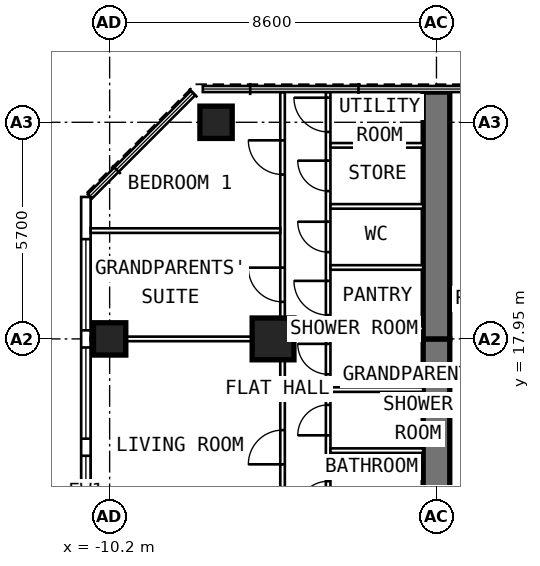
"""IFC4 building model, lengths in metres.
Left out: names, types, materials, properties, quantities, classifications, styles, units other than length and angle.
Written with IfcOpenShell. Run it as: python <this file> out.ifc"""

import sys

from ifc_helpers import new_model, si_unit, direction, frame, frame_2d, origin, origin_2d, place, context, subcontext, project, spatial, rectangle, extrude, element, fill, save


model = new_model("IFC4")
c1 = context("Model", 3, precision=1e-05, world=origin(), true_north=direction((0.0, 1.0)))
c2 = subcontext(c1, "Body", "Model", "MODEL_VIEW")
j1 = project(units=[si_unit("LENGTHUNIT", "METRE"), si_unit("PLANEANGLEUNIT", "RADIAN")], contexts=[c1])
p1 = place(None, origin())
s1 = spatial("IfcSite", under=j1, at=p1, CompositionType="ELEMENT")
p2 = place(p1, origin())
s2 = spatial("IfcBuilding", under=s1, at=p2, CompositionType="ELEMENT")
p3 = place(p2, frame((0.0, 0.0, 253.2)))
s3 = spatial("IfcBuildingStorey", under=s2, at=p3, CompositionType="ELEMENT", Elevation=253.2)
for number, where, z_axis, x_axis in (
    (1, (-10.2, 17.95, 0.0), (0.0, 0.0, 1.0), (0.0, 1.0, 0.0)),
    (2, (-7.4, 23.65, 0.0), (0.0, 0.0, 1.0), (0.0, 1.0, 0.0)),
):
    element("IfcColumn", number, at=place(p3, frame(where, z_axis=z_axis, x_axis=x_axis)), inside=s3, PredefinedType="COLUMN", context=c2, shape_type="SweptSolid", body=[
        extrude(rectangle(XDim=0.85, YDim=0.85, at=origin_2d()), origin(), (0.0, 0.0, 1.0), 3.6),
    ])
p4 = place(p3, frame((-5.9, 17.95, 0.0), z_axis=(0.0, 0.0, 1.0), x_axis=(0.0, 1.0, 0.0)))
e3 = element("IfcColumn", 3, at=p4, inside=s3, PredefinedType="COLUMN", context=c2, shape_type="SweptSolid", body=[
    extrude(rectangle(XDim=1.1, YDim=1.1, at=origin_2d()), origin(), (0.0, 0.0, 1.0), 3.6),
])
p5 = place(p3, frame((-1.6, 9.6, 0.0), z_axis=(0.0, 0.0, 1.0), x_axis=(0.0, 1.0, 0.0)))
e4 = element("IfcWall", 4, at=p5, inside=s3, PredefinedType="SHEAR", context=c2, shape_type="SweptSolid", body=[
    extrude(rectangle(XDim=8.35, YDim=0.7, at=frame_2d((4.175, 0.0))), origin(), (0.0, 0.0, 1.0), 3.6),
])
p6 = place(p5, frame((1.3, 0.0, 0.0)))
e5 = element("IfcOpeningElement", 5, at=p6, cuts=e4, PredefinedType="OPENING", context=c2, shape_type="SweptSolid", body=[
    extrude(rectangle(XDim=1.0, YDim=2.1, at=frame_2d((0.5, 1.05))), frame((0.0, 0.362, 0.0), z_axis=(0.0, -1.0, 0.0), x_axis=(1.0, 0.0, 0.0)), (0.0, 0.0, 1.0), 0.724),
])
p7 = place(p3, frame((-1.6, 17.95, 0.0), z_axis=(0.0, 0.0, 1.0), x_axis=(0.0, 1.0, 0.0)))
e6 = element("IfcWall", 6, at=p7, inside=s3, PredefinedType="SHEAR", context=c2, shape_type="SweptSolid", body=[
    extrude(rectangle(XDim=6.495, YDim=0.7, at=frame_2d((3.248, 0.0))), origin(), (0.0, 0.0, 1.0), 3.6),
])
p8 = place(p3, frame((-10.825, 6.148, 0.0), z_axis=(0.0, 0.0, 1.0), x_axis=(0.0, 1.0, 0.0)))
e7 = element("IfcWall", 7, at=p8, inside=s3, PredefinedType="SOLIDWALL", context=c2, shape_type="SweptSolid", body=[
    extrude(rectangle(XDim=15.537, YDim=0.25, at=frame_2d((7.769, 0.0))), origin(), (0.0, 0.0, 1.0), 3.35),
])
p9 = place(p8, frame((0.627, 0.0, 0.8)))
e8 = element("IfcOpeningElement", 8, at=p9, cuts=e7, PredefinedType="OPENING", context=c2, shape_type="SweptSolid", body=[
    extrude(rectangle(XDim=2.4, YDim=1.8, at=frame_2d((1.2, 0.9))), frame((0.0, 0.137, 0.0), z_axis=(0.0, -1.0, 0.0), x_axis=(1.0, 0.0, 0.0)), (0.0, 0.0, 1.0), 0.274),
])
p10 = place(p8, frame((3.477, 0.0, 0.8)))
e9 = element("IfcOpeningElement", 9, at=p10, cuts=e7, PredefinedType="OPENING", context=c2, shape_type="SweptSolid", body=[
    extrude(rectangle(XDim=2.4, YDim=1.8, at=frame_2d((1.2, 0.9))), frame((0.0, 0.137, 0.0), z_axis=(0.0, -1.0, 0.0), x_axis=(1.0, 0.0, 0.0)), (0.0, 0.0, 1.0), 0.274),
])
p11 = place(p8, frame((6.327, 0.0, 0.8)))
e10 = element("IfcOpeningElement", 10, at=p11, cuts=e7, PredefinedType="OPENING", context=c2, shape_type="SweptSolid", body=[
    extrude(rectangle(XDim=2.4, YDim=1.8, at=frame_2d((1.2, 0.9))), frame((0.0, 0.137, 0.0), z_axis=(0.0, -1.0, 0.0), x_axis=(1.0, 0.0, 0.0)), (0.0, 0.0, 1.0), 0.274),
])
p12 = place(p8, frame((9.177, 0.0, 0.8)))
e11 = element("IfcOpeningElement", 11, at=p12, cuts=e7, PredefinedType="OPENING", context=c2, shape_type="SweptSolid", body=[
    extrude(rectangle(XDim=2.4, YDim=1.8, at=frame_2d((1.2, 0.9))), frame((0.0, 0.137, 0.0), z_axis=(0.0, -1.0, 0.0), x_axis=(1.0, 0.0, 0.0)), (0.0, 0.0, 1.0), 0.274),
])
p13 = place(p8, frame((12.027, 0.0, 0.8)))
e12 = element("IfcOpeningElement", 12, at=p13, cuts=e7, PredefinedType="OPENING", context=c2, shape_type="SweptSolid", body=[
    extrude(rectangle(XDim=2.4, YDim=1.8, at=frame_2d((1.2, 0.9))), frame((0.0, 0.137, 0.0), z_axis=(0.0, -1.0, 0.0), x_axis=(1.0, 0.0, 0.0)), (0.0, 0.0, 1.0), 0.274),
])
p14 = place(p3, frame((-4.45, 9.9, 0.0), z_axis=(0.0, 0.0, 1.0), x_axis=(0.0, 1.0, 0.0)))
e13 = element("IfcWall", 13, at=p14, inside=s3, PredefinedType="PARTITIONING", context=c2, shape_type="SweptSolid", body=[
    extrude(rectangle(XDim=14.545, YDim=0.12, at=frame_2d((7.272, 0.0))), origin(), (0.0, 0.0, 1.0), 3.35),
])
p15 = place(p14, frame((0.95, 0.0, 0.0)))
e14 = element("IfcOpeningElement", 14, at=p15, cuts=e13, PredefinedType="OPENING", context=c2, shape_type="SweptSolid", body=[
    extrude(rectangle(XDim=0.9, YDim=2.1, at=frame_2d((0.45, 1.05))), frame((0.0, 0.072, 0.0), z_axis=(0.0, -1.0, 0.0), x_axis=(1.0, 0.0, 0.0)), (0.0, 0.0, 1.0), 0.144),
])
p16 = place(p14, frame((3.505, 0.0, 0.0)))
e15 = element("IfcOpeningElement", 15, at=p16, cuts=e13, PredefinedType="OPENING", context=c2, shape_type="SweptSolid", body=[
    extrude(rectangle(XDim=0.8, YDim=2.1, at=frame_2d((0.4, 1.05))), frame((0.0, 0.072, 0.0), z_axis=(0.0, -1.0, 0.0), x_axis=(1.0, 0.0, 0.0)), (0.0, 0.0, 1.0), 0.144),
])
p17 = place(p14, frame((5.513, 0.0, 0.0)))
e16 = element("IfcOpeningElement", 16, at=p17, cuts=e13, PredefinedType="OPENING", context=c2, shape_type="SweptSolid", body=[
    extrude(rectangle(XDim=0.8, YDim=2.1, at=frame_2d((0.4, 1.05))), frame((0.0, 0.072, 0.0), z_axis=(0.0, -1.0, 0.0), x_axis=(1.0, 0.0, 0.0)), (0.0, 0.0, 1.0), 0.144),
])
p18 = place(p14, frame((7.12, 0.0, 0.0)))
e17 = element("IfcOpeningElement", 17, at=p18, cuts=e13, PredefinedType="OPENING", context=c2, shape_type="SweptSolid", body=[
    extrude(rectangle(XDim=0.8, YDim=2.1, at=frame_2d((0.4, 1.05))), frame((0.0, 0.072, 0.0), z_axis=(0.0, -1.0, 0.0), x_axis=(1.0, 0.0, 0.0)), (0.0, 0.0, 1.0), 0.144),
])
p19 = place(p14, frame((8.677, 0.0, 0.0)))
e18 = element("IfcOpeningElement", 18, at=p19, cuts=e13, PredefinedType="OPENING", context=c2, shape_type="SweptSolid", body=[
    extrude(rectangle(XDim=0.9, YDim=2.1, at=frame_2d((0.45, 1.05))), frame((0.0, 0.072, 0.0), z_axis=(0.0, -1.0, 0.0), x_axis=(1.0, 0.0, 0.0)), (0.0, 0.0, 1.0), 0.144),
])
p20 = place(p14, frame((10.333, 0.0, 0.0)))
e19 = element("IfcOpeningElement", 19, at=p20, cuts=e13, PredefinedType="OPENING", context=c2, shape_type="SweptSolid", body=[
    extrude(rectangle(XDim=0.8, YDim=2.1, at=frame_2d((0.4, 1.05))), frame((0.0, 0.072, 0.0), z_axis=(0.0, -1.0, 0.0), x_axis=(1.0, 0.0, 0.0)), (0.0, 0.0, 1.0), 0.144),
])
p21 = place(p14, frame((11.94, 0.0, 0.0)))
e20 = element("IfcOpeningElement", 20, at=p21, cuts=e13, PredefinedType="OPENING", context=c2, shape_type="SweptSolid", body=[
    extrude(rectangle(XDim=0.8, YDim=2.1, at=frame_2d((0.4, 1.05))), frame((0.0, 0.072, 0.0), z_axis=(0.0, -1.0, 0.0), x_axis=(1.0, 0.0, 0.0)), (0.0, 0.0, 1.0), 0.144),
])
p22 = place(p14, frame((13.497, 0.0, 0.0)))
e21 = element("IfcOpeningElement", 21, at=p22, cuts=e13, PredefinedType="OPENING", context=c2, shape_type="SweptSolid", body=[
    extrude(rectangle(XDim=0.9, YDim=2.1, at=frame_2d((0.45, 1.05))), frame((0.0, 0.072, 0.0), z_axis=(0.0, -1.0, 0.0), x_axis=(1.0, 0.0, 0.0)), (0.0, 0.0, 1.0), 0.144),
])
p23 = place(p3, frame((-5.65, 9.6, 0.0), z_axis=(0.0, 0.0, 1.0), x_axis=(0.0, 1.0, 0.0)))
e22 = element("IfcWall", 22, at=p23, inside=s3, PredefinedType="PARTITIONING", context=c2, shape_type="SweptSolid", body=[
    extrude(rectangle(XDim=14.845, YDim=0.12, at=frame_2d((7.422, 0.0))), origin(), (0.0, 0.0, 1.0), 3.35),
])
p24 = place(p23, frame((5.05, 0.0, 0.0)))
e23 = element("IfcOpeningElement", 23, at=p24, cuts=e22, PredefinedType="OPENING", context=c2, shape_type="SweptSolid", body=[
    extrude(rectangle(XDim=0.9, YDim=2.1, at=frame_2d((0.45, 1.05))), frame((0.0, 0.072, 0.0), z_axis=(0.0, -1.0, 0.0), x_axis=(1.0, 0.0, 0.0)), (0.0, 0.0, 1.0), 0.144),
])
p25 = place(p23, frame((9.325, 0.0, 0.0)))
e24 = element("IfcOpeningElement", 24, at=p25, cuts=e22, PredefinedType="OPENING", context=c2, shape_type="SweptSolid", body=[
    extrude(rectangle(XDim=0.9, YDim=2.1, at=frame_2d((0.45, 1.05))), frame((0.0, 0.072, 0.0), z_axis=(0.0, -1.0, 0.0), x_axis=(1.0, 0.0, 0.0)), (0.0, 0.0, 1.0), 0.144),
])
p26 = place(p23, frame((12.675, 0.0, 0.0)))
e25 = element("IfcOpeningElement", 25, at=p26, cuts=e22, PredefinedType="OPENING", context=c2, shape_type="SweptSolid", body=[
    extrude(rectangle(XDim=0.9, YDim=2.1, at=frame_2d((0.45, 1.05))), frame((0.0, 0.072, 0.0), z_axis=(0.0, -1.0, 0.0), x_axis=(1.0, 0.0, 0.0)), (0.0, 0.0, 1.0), 0.144),
])
p27 = place(p3, frame((-5.71, 17.95, 0.0), z_axis=(0.0, 0.0, 1.0), x_axis=(-1.0, 0.0, 0.0)))
e26 = element("IfcWall", 26, at=p27, inside=s3, PredefinedType="PARTITIONING", context=c2, shape_type="SweptSolid", body=[
    extrude(rectangle(XDim=4.99, YDim=0.12, at=frame_2d((2.495, 0.0))), origin(), (0.0, 0.0, 1.0), 2.45),
])
p28 = place(p3, frame((-5.71, 20.8, 0.0), z_axis=(0.0, 0.0, 1.0), x_axis=(-1.0, 0.0, 0.0)))
e27 = element("IfcWall", 27, at=p28, inside=s3, PredefinedType="PARTITIONING", context=c2, shape_type="SweptSolid", body=[
    extrude(rectangle(XDim=4.99, YDim=0.12, at=frame_2d((2.495, 0.0))), origin(), (0.0, 0.0, 1.0), 3.35),
])
for number, where, z_axis, x_axis in (
    (28, (-1.95, 15.01, 0.0), (0.0, 0.0, 1.0), (-1.0, 0.0, 0.0)),
    (29, (-1.95, 16.617, 0.0), (0.0, 0.0, 1.0), (-1.0, 0.0, 0.0)),
):
    element("IfcWall", number, at=place(p3, frame(where, z_axis=z_axis, x_axis=x_axis)), inside=s3, PredefinedType="PARTITIONING", context=c2, shape_type="SweptSolid", body=[
        extrude(rectangle(XDim=2.44, YDim=0.12, at=frame_2d((1.22, 0.0))), origin(), (0.0, 0.0, 1.0), 3.35),
    ])
p29 = place(p3, frame((-1.95, 18.223, 0.0), z_axis=(0.0, 0.0, 1.0), x_axis=(-1.0, 0.0, 0.0)))
e30 = element("IfcWall", 30, at=p29, inside=s3, PredefinedType="PARTITIONING", context=c2, shape_type="SweptSolid", body=[
    extrude(rectangle(XDim=2.44, YDim=0.12, at=frame_2d((1.22, 0.0))), origin(), (0.0, 0.0, 1.0), 2.45),
])
for number, where, z_axis, x_axis in (
    (31, (-1.95, 19.83, 0.0), (0.0, 0.0, 1.0), (-1.0, 0.0, 0.0)),
    (32, (-1.95, 21.437, 0.0), (0.0, 0.0, 1.0), (-1.0, 0.0, 0.0)),
    (33, (-1.95, 23.043, 0.0), (0.0, 0.0, 1.0), (-1.0, 0.0, 0.0)),
):
    element("IfcWall", number, at=place(p3, frame(where, z_axis=z_axis, x_axis=x_axis)), inside=s3, PredefinedType="PARTITIONING", context=c2, shape_type="SweptSolid", body=[
        extrude(rectangle(XDim=2.44, YDim=0.12, at=frame_2d((1.22, 0.0))), origin(), (0.0, 0.0, 1.0), 3.35),
    ])
p30 = place(p11, origin())
e34 = element("IfcWindow", 34, at=p30, inside=s3, PartitioningType="SINGLE_PANEL", PredefinedType="WINDOW", context=c2, shape_type="SweptSolid", body=[
    extrude(rectangle(XDim=2.4, YDim=1.8, at=frame_2d((1.2, 0.9))), frame((0.0, 0.03, 0.0), z_axis=(0.0, -1.0, 0.0), x_axis=(1.0, 0.0, 0.0)), (0.0, 0.0, 1.0), 0.06),
])
fill(e10, e34)
p31 = place(p12, origin())
e35 = element("IfcWindow", 35, at=p31, inside=s3, PartitioningType="SINGLE_PANEL", PredefinedType="WINDOW", context=c2, shape_type="SweptSolid", body=[
    extrude(rectangle(XDim=2.4, YDim=1.8, at=frame_2d((1.2, 0.9))), frame((0.0, 0.03, 0.0), z_axis=(0.0, -1.0, 0.0), x_axis=(1.0, 0.0, 0.0)), (0.0, 0.0, 1.0), 0.06),
])
fill(e11, e35)
p32 = place(p13, origin())
e36 = element("IfcWindow", 36, at=p32, inside=s3, PartitioningType="SINGLE_PANEL", PredefinedType="WINDOW", context=c2, shape_type="SweptSolid", body=[
    extrude(rectangle(XDim=2.4, YDim=1.8, at=frame_2d((1.2, 0.9))), frame((0.0, 0.03, 0.0), z_axis=(0.0, -1.0, 0.0), x_axis=(1.0, 0.0, 0.0)), (0.0, 0.0, 1.0), 0.06),
])
fill(e12, e36)
p33 = place(p24, origin())
e37 = element("IfcDoor", 37, at=p33, inside=s3, OperationType="SINGLE_SWING_LEFT", PredefinedType="DOOR", context=c2, shape_type="SweptSolid", body=[
    extrude(rectangle(XDim=0.9, YDim=2.1, at=frame_2d((0.45, 1.05))), frame((0.0, 0.025, 0.0), z_axis=(0.0, -1.0, 0.0), x_axis=(1.0, 0.0, 0.0)), (0.0, 0.0, 1.0), 0.05),
])
fill(e23, e37)
p34 = place(p25, origin())
e38 = element("IfcDoor", 38, at=p34, inside=s3, OperationType="SINGLE_SWING_RIGHT", PredefinedType="DOOR", context=c2, shape_type="SweptSolid", body=[
    extrude(rectangle(XDim=0.9, YDim=2.1, at=frame_2d((0.45, 1.05))), frame((0.0, 0.025, 0.0), z_axis=(0.0, -1.0, 0.0), x_axis=(1.0, 0.0, 0.0)), (0.0, 0.0, 1.0), 0.05),
])
fill(e24, e38)
p35 = place(p26, origin())
e39 = element("IfcDoor", 39, at=p35, inside=s3, OperationType="SINGLE_SWING_RIGHT", PredefinedType="DOOR", context=c2, shape_type="SweptSolid", body=[
    extrude(rectangle(XDim=0.9, YDim=2.1, at=frame_2d((0.45, 1.05))), frame((0.0, 0.025, 0.0), z_axis=(0.0, -1.0, 0.0), x_axis=(1.0, 0.0, 0.0)), (0.0, 0.0, 1.0), 0.05),
])
fill(e25, e39)
p36 = place(p16, origin())
e40 = element("IfcDoor", 40, at=p36, inside=s3, OperationType="SINGLE_SWING_LEFT", PredefinedType="DOOR", context=c2, shape_type="SweptSolid", body=[
    extrude(rectangle(XDim=0.8, YDim=2.1, at=frame_2d((0.4, 1.05))), frame((0.0, 0.025, 0.0), z_axis=(0.0, -1.0, 0.0), x_axis=(1.0, 0.0, 0.0)), (0.0, 0.0, 1.0), 0.05),
])
fill(e15, e40)
p37 = place(p17, origin())
e41 = element("IfcDoor", 41, at=p37, inside=s3, OperationType="SINGLE_SWING_LEFT", PredefinedType="DOOR", context=c2, shape_type="SweptSolid", body=[
    extrude(rectangle(XDim=0.8, YDim=2.1, at=frame_2d((0.4, 1.05))), frame((0.0, 0.025, 0.0), z_axis=(0.0, -1.0, 0.0), x_axis=(1.0, 0.0, 0.0)), (0.0, 0.0, 1.0), 0.05),
])
fill(e16, e41)
p38 = place(p18, origin())
e42 = element("IfcDoor", 42, at=p38, inside=s3, OperationType="SINGLE_SWING_RIGHT", PredefinedType="DOOR", context=c2, shape_type="SweptSolid", body=[
    extrude(rectangle(XDim=0.8, YDim=2.1, at=frame_2d((0.4, 1.05))), frame((0.0, 0.025, 0.0), z_axis=(0.0, -1.0, 0.0), x_axis=(1.0, 0.0, 0.0)), (0.0, 0.0, 1.0), 0.05),
])
fill(e17, e42)
p39 = place(p19, origin())
e43 = element("IfcDoor", 43, at=p39, inside=s3, OperationType="SINGLE_SWING_RIGHT", PredefinedType="DOOR", context=c2, shape_type="SweptSolid", body=[
    extrude(rectangle(XDim=0.9, YDim=2.1, at=frame_2d((0.45, 1.05))), frame((0.0, 0.025, 0.0), z_axis=(0.0, -1.0, 0.0), x_axis=(1.0, 0.0, 0.0)), (0.0, 0.0, 1.0), 0.05),
])
fill(e18, e43)
p40 = place(p20, origin())
e44 = element("IfcDoor", 44, at=p40, inside=s3, OperationType="SINGLE_SWING_RIGHT", PredefinedType="DOOR", context=c2, shape_type="SweptSolid", body=[
    extrude(rectangle(XDim=0.8, YDim=2.1, at=frame_2d((0.4, 1.05))), frame((0.0, 0.025, 0.0), z_axis=(0.0, -1.0, 0.0), x_axis=(1.0, 0.0, 0.0)), (0.0, 0.0, 1.0), 0.05),
])
fill(e19, e44)
p41 = place(p21, origin())
e45 = element("IfcDoor", 45, at=p41, inside=s3, OperationType="SINGLE_SWING_RIGHT", PredefinedType="DOOR", context=c2, shape_type="SweptSolid", body=[
    extrude(rectangle(XDim=0.8, YDim=2.1, at=frame_2d((0.4, 1.05))), frame((0.0, 0.025, 0.0), z_axis=(0.0, -1.0, 0.0), x_axis=(1.0, 0.0, 0.0)), (0.0, 0.0, 1.0), 0.05),
])
fill(e20, e45)
p42 = place(p22, origin())
e46 = element("IfcDoor", 46, at=p42, inside=s3, OperationType="SINGLE_SWING_RIGHT", PredefinedType="DOOR", context=c2, shape_type="SweptSolid", body=[
    extrude(rectangle(XDim=0.9, YDim=2.1, at=frame_2d((0.45, 1.05))), frame((0.0, 0.025, 0.0), z_axis=(0.0, -1.0, 0.0), x_axis=(1.0, 0.0, 0.0)), (0.0, 0.0, 1.0), 0.05),
])
fill(e21, e46)
save(model, sys.argv[1])
